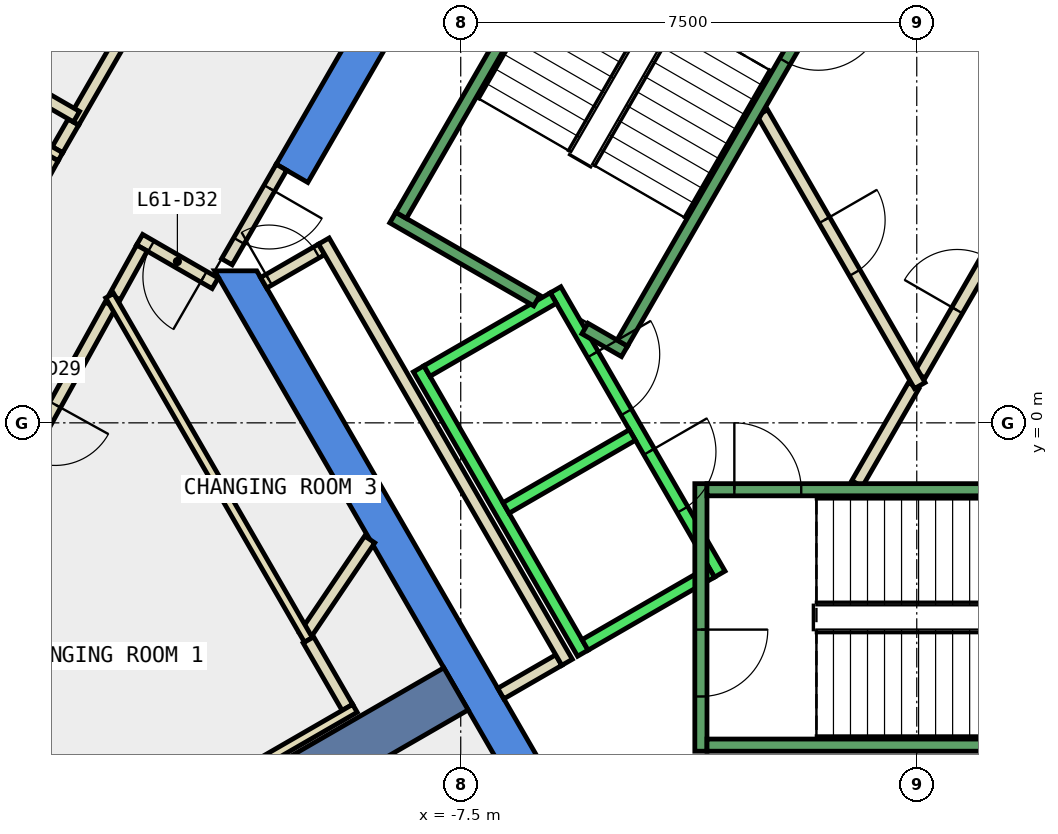
"""IFC4 building model, lengths in metres.
Left out: names, types, materials, properties, quantities, classifications, styles, units other than length and angle.
Written with IfcOpenShell. Run it as: python <this file> out.ifc"""

import sys

from ifc_helpers import new_model, si_unit, direction, frame, frame_2d, origin, place, context, subcontext, project, spatial, polyline, rectangle, outline, extrude, element, fill, save


model = new_model("IFC4")
c1 = context("Model", 3, precision=1e-05, world=origin(), true_north=direction((0.0, 1.0)))
c2 = subcontext(c1, "Body", "Model", "MODEL_VIEW")
j1 = project(units=[si_unit("LENGTHUNIT", "METRE"), si_unit("PLANEANGLEUNIT", "RADIAN")], contexts=[c1])
p1 = place(None, origin())
s1 = spatial("IfcSite", under=j1, at=p1, CompositionType="ELEMENT")
p2 = place(p1, origin())
s2 = spatial("IfcBuilding", under=s1, at=p2, CompositionType="ELEMENT")
p3 = place(p2, frame((0.0, 0.0, 266.6)))
s3 = spatial("IfcBuildingStorey", under=s2, at=p3, CompositionType="ELEMENT", Elevation=266.6)
p4 = place(p3, frame((0.0, 0.0, -0.34)))
e1 = element("IfcWall", 1, at=p4, inside=s3, PredefinedType="SHEAR", context=c2, shape_type="SweptSolid", body=[
    extrude(outline(polyline([(-10.535, 4.253), (-10.015, 3.953), (-5.427, 11.9), (-5.774, 12.5), (-10.535, 4.253)])), origin(), (0.0, 0.0, 1.0), 3.6),
])
p5 = place(p3, frame((0.0, 0.0, -0.34)))
e2 = element("IfcWall", 2, at=p5, inside=s3, PredefinedType="SHEAR", context=c2, shape_type="SweptSolid", body=[
    extrude(outline(polyline([(-11.547, 2.5), (-5.774, -7.5), (-5.427, -6.9), (-10.854, 2.5), (-11.547, 2.5)])), origin(), (0.0, 0.0, 1.0), 3.6),
])
p6 = place(p3, frame((-7.578, -4.375, -0.34), z_axis=(0.0, 0.0, 1.0), x_axis=(-0.866024315419, -0.5000018851, 0.0)))
e3 = element("IfcWall", 3, at=p6, inside=s3, PredefinedType="SHEAR", context=c2, shape_type="SweptSolid", body=[
    extrude(rectangle(XDim=9.0, YDim=0.8, at=frame_2d((4.5, 0.0))), origin(), (0.0, 0.0, 1.0), 3.6),
])
p7 = place(p3, frame((-11.539, 2.295, 0.0), z_axis=(0.0, 0.0, 1.0), x_axis=(-0.866023989838, 0.500002449018, 0.0)))
e4 = element("IfcWall", 4, at=p7, inside=s3, PredefinedType="PARTITIONING", context=c2, shape_type="SweptSolid", body=[
    extrude(rectangle(XDim=1.434, YDim=0.2, at=frame_2d((0.717, 0.0))), origin(), (0.0, 0.0, 1.0), 3.26),
])
p8 = place(p7, frame((0.217, 0.0, 0.0)))
e5 = element("IfcOpeningElement", 5, at=p8, cuts=e4, PredefinedType="OPENING", context=c2, shape_type="SweptSolid", body=[
    extrude(rectangle(XDim=1.0, YDim=2.1, at=frame_2d((0.5, 1.05))), frame((0.0, 0.11, 0.0), z_axis=(0.0, -1.0, 0.0), x_axis=(1.0, 0.0, 0.0)), (0.0, 0.0, 1.0), 0.22),
])
p9 = place(p3, frame((-12.743, 2.875, 0.0), z_axis=(0.0, 0.0, 1.0), x_axis=(-0.484334040176, -0.8748831565, 0.0)))
e6 = element("IfcWall", 6, at=p9, inside=s3, PredefinedType="PARTITIONING", context=c2, shape_type="SweptSolid", body=[
    extrude(rectangle(XDim=0.919, YDim=0.2, at=frame_2d((0.459, 0.0))), origin(), (0.0, 0.0, 1.0), 3.26),
])
p10 = place(p3, frame((-13.261, 1.939, 0.0), z_axis=(0.0, 0.0, 1.0), x_axis=(-0.484323615817, -0.874888927329, 0.0)))
e7 = element("IfcWall", 7, at=p10, inside=s3, PredefinedType="PARTITIONING", context=c2, shape_type="SweptSolid", body=[
    extrude(rectangle(XDim=4.747, YDim=0.2, at=frame_2d((2.374, 0.0))), origin(), (0.0, 0.0, 1.0), 3.26),
])
p11 = place(p10, frame((1.874, 0.0, 0.0)))
e8 = element("IfcOpeningElement", 8, at=p11, cuts=e7, PredefinedType="OPENING", context=c2, shape_type="SweptSolid", body=[
    extrude(rectangle(XDim=1.0, YDim=2.1, at=frame_2d((0.5, 1.05))), frame((0.0, 0.11, 0.0), z_axis=(0.0, -1.0, 0.0), x_axis=(1.0, 0.0, 0.0)), (0.0, 0.0, 1.0), 0.22),
])
p12 = place(p3, frame((-14.132, 4.492, 0.0), z_axis=(0.0, 0.0, 1.0), x_axis=(0.499829488579, 0.86612382622, 0.0)))
e9 = element("IfcWall", 9, at=p12, inside=s3, PredefinedType="PARTITIONING", context=c2, shape_type="SweptSolid", body=[
    extrude(rectangle(XDim=0.527, YDim=0.2, at=frame_2d((0.263, 0.0))), origin(), (0.0, 0.0, 1.0), 3.26),
])
p13 = place(p3, frame((-13.869, 4.948, 0.0), z_axis=(0.0, 0.0, 1.0), x_axis=(0.49994636267, 0.866056369097, 0.0)))
e10 = element("IfcWall", 10, at=p13, inside=s3, PredefinedType="PARTITIONING", context=c2, shape_type="SweptSolid", body=[
    extrude(rectangle(XDim=2.8, YDim=0.2, at=frame_2d((1.4, 0.0))), origin(), (0.0, 0.0, 1.0), 3.26),
])
p14 = place(p3, frame((-15.671, 1.714, 0.0), z_axis=(0.0, 0.0, 1.0), x_axis=(0.484203367026, 0.874955484216, 0.0)))
e11 = element("IfcWall", 11, at=p14, inside=s3, PredefinedType="PARTITIONING", context=c2, shape_type="SweptSolid", body=[
    extrude(rectangle(XDim=3.025, YDim=0.2, at=frame_2d((1.513, 0.0))), origin(), (0.0, 0.0, 1.0), 3.26),
])
p15 = place(p14, frame((1.013, 0.0, 0.0)))
e12 = element("IfcOpeningElement", 12, at=p15, cuts=e11, PredefinedType="OPENING", context=c2, shape_type="SweptSolid", body=[
    extrude(rectangle(XDim=1.0, YDim=2.1, at=frame_2d((0.5, 1.05))), frame((0.0, 0.11, 0.0), z_axis=(0.0, -1.0, 0.0), x_axis=(1.0, 0.0, 0.0)), (0.0, 0.0, 1.0), 0.22),
])
p16 = place(p3, frame((-5.888, -3.902, 0.0), z_axis=(0.0, 0.0, 1.0), x_axis=(-0.86621513555, -0.499671230855, 0.0)))
e13 = element("IfcWall", 13, at=p16, inside=s3, PredefinedType="PARTITIONING", context=c2, shape_type="SweptSolid", body=[
    extrude(rectangle(XDim=1.1, YDim=0.2, at=frame_2d((0.55, 0.0))), origin(), (0.0, 0.0, 1.0), 3.26),
])
p17 = place(p3, frame((-10.741, 2.303, 0.0), z_axis=(0.0, 0.0, 1.0), x_axis=(0.866063652425, 0.499933745558, 0.0)))
e14 = element("IfcWall", 14, at=p17, inside=s3, PredefinedType="PARTITIONING", context=c2, shape_type="SweptSolid", body=[
    extrude(rectangle(XDim=1.1, YDim=0.2, at=frame_2d((0.55, 0.0))), origin(), (0.0, 0.0, 1.0), 3.26),
])
p18 = place(p17, frame((0.1, 0.0, 0.0)))
e15 = element("IfcOpeningElement", 15, at=p18, cuts=e14, PredefinedType="OPENING", context=c2, shape_type="SweptSolid", body=[
    extrude(rectangle(XDim=0.9, YDim=2.1, at=frame_2d((0.45, 1.05))), frame((0.0, 0.11, 0.0), z_axis=(0.0, -1.0, 0.0), x_axis=(1.0, 0.0, 0.0)), (0.0, 0.0, 1.0), 0.22),
])
p19 = place(p3, frame((-9.751, 2.99, 0.0), z_axis=(0.0, 0.0, 1.0), x_axis=(0.500012163284, -0.866018381195, 0.0)))
e16 = element("IfcWall", 16, at=p19, inside=s3, PredefinedType="PARTITIONING", context=c2, shape_type="SweptSolid", body=[
    extrude(rectangle(XDim=8.0, YDim=0.2, at=frame_2d((4.0, 0.0))), origin(), (0.0, 0.0, 1.0), 3.26),
])
p20 = place(p3, frame((-10.069, -3.504, 0.0), z_axis=(0.0, 0.0, 1.0), x_axis=(0.559779346026, 0.828641710127, 0.0)))
e17 = element("IfcWall", 17, at=p20, inside=s3, PredefinedType="PARTITIONING", context=c2, shape_type="SweptSolid", body=[
    extrude(rectangle(XDim=1.915, YDim=0.2, at=frame_2d((0.958, 0.0))), origin(), (0.0, 0.0, 1.0), 3.26),
])
p21 = place(p3, frame((-13.274, 2.092, 0.0), z_axis=(0.0, 0.0, 1.0), x_axis=(0.500002592159, -0.866023907196, 0.0)))
e18 = element("IfcWall", 18, at=p21, inside=s3, PredefinedType="PARTITIONING", context=c2, shape_type="SweptSolid", body=[
    extrude(rectangle(XDim=6.538, YDim=0.15, at=frame_2d((3.269, 0.0))), origin(), (0.0, 0.0, 1.0), 3.26),
])
p22 = place(p3, frame((-0.982, -1.0, 0.0), z_axis=(0.0, 0.0, 1.0), x_axis=(0.50024047865, 0.865886518847, 0.0)))
e19 = element("IfcWall", 19, at=p22, inside=s3, PredefinedType="PARTITIONING", context=c2, shape_type="SweptSolid", body=[
    extrude(rectangle(XDim=1.863, YDim=0.2, at=frame_2d((0.931, 0.0))), origin(), (0.0, 0.0, 1.0), 3.26),
])
p23 = place(p3, frame((0.05, 0.787, 0.0), z_axis=(0.0, 0.0, 1.0), x_axis=(0.499954076797, 0.866051915934, 0.0)))
e20 = element("IfcWall", 20, at=p23, inside=s3, PredefinedType="PARTITIONING", context=c2, shape_type="SweptSolid", body=[
    extrude(rectangle(XDim=3.558, YDim=0.2, at=frame_2d((1.779, 0.0))), origin(), (0.0, 0.0, 1.0), 3.26),
])
p24 = place(p23, frame((1.229, 0.0, 0.0)))
e21 = element("IfcOpeningElement", 21, at=p24, cuts=e20, PredefinedType="OPENING", context=c2, shape_type="SweptSolid", body=[
    extrude(rectangle(XDim=1.0, YDim=2.1, at=frame_2d((0.5, 1.05))), frame((0.0, 0.11, 0.0), z_axis=(0.0, -1.0, 0.0), x_axis=(1.0, 0.0, 0.0)), (0.0, 0.0, 1.0), 0.22),
])
p25 = place(p3, frame((-2.54, 5.1, 0.0), z_axis=(0.0, 0.0, 1.0), x_axis=(0.499925051871, -0.866068670783, 0.0)))
e22 = element("IfcWall", 22, at=p25, inside=s3, PredefinedType="PARTITIONING", context=c2, shape_type="SweptSolid", body=[
    extrude(rectangle(XDim=5.181, YDim=0.2, at=frame_2d((2.59, 0.0))), origin(), (0.0, 0.0, 1.0), 3.26),
])
p26 = place(p25, frame((2.04, 0.0, 0.0)))
e23 = element("IfcOpeningElement", 23, at=p26, cuts=e22, PredefinedType="OPENING", context=c2, shape_type="SweptSolid", body=[
    extrude(rectangle(XDim=1.0, YDim=2.1, at=frame_2d((0.5, 1.05))), frame((0.0, 0.11, 0.0), z_axis=(0.0, -1.0, 0.0), x_axis=(1.0, 0.0, 0.0)), (0.0, 0.0, 1.0), 0.22),
])
p27 = place(p3, frame((-9.364, -4.68, 0.0), z_axis=(0.0, 0.0, 1.0), x_axis=(-0.500052244015, 0.865995238587, 0.0)))
e24 = element("IfcWall", 24, at=p27, inside=s3, PredefinedType="PARTITIONING", context=c2, shape_type="SweptSolid", body=[
    extrude(rectangle(XDim=1.281, YDim=0.2, at=frame_2d((0.641, 0.0))), origin(), (0.0, 0.0, 1.0), 3.26),
])
p28 = place(p3, frame((-9.24, -4.695, 0.0), z_axis=(0.0, 0.0, 1.0), x_axis=(-0.866015037582, -0.500017954359, 0.0)))
e25 = element("IfcWall", 25, at=p28, inside=s3, PredefinedType="PARTITIONING", context=c2, shape_type="SweptSolid", body=[
    extrude(rectangle(XDim=7.176, YDim=0.15, at=frame_2d((3.588, 0.0))), origin(), (0.0, 0.0, 1.0), 3.26),
])
p29 = place(p3, frame((-15.984, 6.285, 0.0), z_axis=(0.0, 0.0, 1.0), x_axis=(0.865998541277, -0.500046524342, 0.0)))
e26 = element("IfcWall", 26, at=p29, inside=s3, PredefinedType="PARTITIONING", context=c2, shape_type="SweptSolid", body=[
    extrude(rectangle(XDim=2.5, YDim=0.2, at=frame_2d((1.25, 0.0))), origin(), (0.0, 0.0, 1.0), 3.26),
])
p30 = place(p3, frame((-14.083, 4.377, 0.0), z_axis=(0.0, 0.0, 1.0), x_axis=(-0.870415885751, 0.492317159799, 0.0)))
e27 = element("IfcWall", 27, at=p30, inside=s3, PredefinedType="PARTITIONING", context=c2, shape_type="SweptSolid", body=[
    extrude(rectangle(XDim=4.581, YDim=0.15, at=frame_2d((2.29, 0.0))), origin(), (0.0, 0.0, 1.0), 3.26),
])
p31 = place(p3, frame((-10.449, 4.203, 0.0), z_axis=(0.0, 0.0, 1.0), x_axis=(-0.499914839587, -0.866074565589, 0.0)))
e28 = element("IfcWall", 28, at=p31, inside=s3, PredefinedType="PARTITIONING", context=c2, shape_type="SweptSolid", body=[
    extrude(rectangle(XDim=1.794, YDim=0.2, at=frame_2d((0.897, 0.0))), origin(), (0.0, 0.0, 1.0), 2.4),
])
p32 = place(p31, frame((0.397, 0.0, 0.0)))
e29 = element("IfcOpeningElement", 29, at=p32, cuts=e28, PredefinedType="OPENING", context=c2, shape_type="SweptSolid", body=[
    extrude(rectangle(XDim=1.0, YDim=2.1, at=frame_2d((0.5, 1.05))), frame((0.0, 0.11, 0.0), z_axis=(0.0, -1.0, 0.0), x_axis=(1.0, 0.0, 0.0)), (0.0, 0.0, 1.0), 0.22),
])
p33 = place(p3, frame((-5.94, 2.188, 0.0), z_axis=(0.0, 0.0, 1.0), x_axis=(0.500034260056, -0.866005622828, 0.0)))
e30 = element("IfcWall", 30, at=p33, inside=s3, PredefinedType="STANDARD", context=c2, shape_type="SweptSolid", body=[
    extrude(rectangle(XDim=5.399, YDim=0.2, at=frame_2d((2.7, 0.0))), origin(), (0.0, 0.0, 1.0), 3.26),
])
p34 = place(p33, frame((3.075, 0.0, 0.0)))
e31 = element("IfcOpeningElement", 31, at=p34, cuts=e30, PredefinedType="OPENING", context=c2, shape_type="SweptSolid", body=[
    extrude(rectangle(XDim=1.1, YDim=2.1, at=frame_2d((0.55, 1.05))), frame((0.0, 0.11, 0.0), z_axis=(0.0, -1.0, 0.0), x_axis=(1.0, 0.0, 0.0)), (0.0, 0.0, 1.0), 0.22),
])
p35 = place(p33, frame((1.225, 0.0, 0.0)))
e32 = element("IfcOpeningElement", 32, at=p35, cuts=e30, PredefinedType="OPENING", context=c2, shape_type="SweptSolid", body=[
    extrude(rectangle(XDim=1.1, YDim=2.1, at=frame_2d((0.55, 1.05))), frame((0.0, 0.11, 0.0), z_axis=(0.0, -1.0, 0.0), x_axis=(1.0, 0.0, 0.0)), (0.0, 0.0, 1.0), 0.22),
])
p36 = place(p3, frame((-8.192, 0.888, 0.0), z_axis=(0.0, 0.0, 1.0), x_axis=(0.500034260056, -0.866005622828, 0.0)))
e33 = element("IfcWall", 33, at=p36, inside=s3, PredefinedType="STANDARD", context=c2, shape_type="SweptSolid", body=[
    extrude(rectangle(XDim=5.399, YDim=0.2, at=frame_2d((2.7, 0.0))), origin(), (0.0, 0.0, 1.0), 3.26),
])
for number, where, z_axis, x_axis in (
    (34, (-5.977, 2.052, 0.0), (0.0, 0.0, 1.0), (-0.866, -0.5, 0.0)),
    (35, (-4.677, -0.2, 0.0), (0.0, 0.0, 1.0), (-0.866, -0.5, 0.0)),
):
    element("IfcWall", number, at=place(p3, frame(where, z_axis=z_axis, x_axis=x_axis)), inside=s3, PredefinedType="STANDARD", context=c2, shape_type="SweptSolid", body=[
        extrude(rectangle(XDim=2.399, YDim=0.2, at=frame_2d((1.2, 0.0))), origin(), (0.0, 0.0, 1.0), 3.26),
    ])
p37 = place(p3, frame((-3.377, -2.452, 0.0), z_axis=(0.0, 0.0, 1.0), x_axis=(-0.865955154139, -0.50012165622, 0.0)))
e36 = element("IfcWall", 36, at=p37, inside=s3, PredefinedType="STANDARD", context=c2, shape_type="SweptSolid", body=[
    extrude(rectangle(XDim=2.4, YDim=0.2, at=frame_2d((1.2, 0.0))), origin(), (0.0, 0.0, 1.0), 3.26),
])
p38 = place(p3, frame((-3.55, -1.0, 0.0), z_axis=(0.0, 0.0, 1.0), x_axis=(0.0, -1.0, 0.0)))
e37 = element("IfcWall", 37, at=p38, inside=s3, PredefinedType="STANDARD", context=c2, shape_type="SweptSolid", body=[
    extrude(rectangle(XDim=4.4, YDim=0.2, at=frame_2d((2.2, 0.0))), origin(), (0.0, 0.0, 1.0), 3.26),
])
p39 = place(p38, frame((2.4, 0.0, 0.0)))
e38 = element("IfcOpeningElement", 38, at=p39, cuts=e37, PredefinedType="OPENING", context=c2, shape_type="SweptSolid", body=[
    extrude(rectangle(XDim=1.1, YDim=2.2, at=frame_2d((0.55, 1.1))), frame((0.0, 0.11, 0.0), z_axis=(0.0, -1.0, 0.0), x_axis=(1.0, 0.0, 0.0)), (0.0, 0.0, 1.0), 0.22),
])
p40 = place(p3, frame((-3.45, -1.1, 0.0), z_axis=(0.0, 0.0, 1.0), x_axis=(1.0, 0.0, 0.0)))
e39 = element("IfcWall", 39, at=p40, inside=s3, PredefinedType="STANDARD", context=c2, shape_type="SweptSolid", body=[
    extrude(rectangle(XDim=6.9, YDim=0.2, at=frame_2d((3.45, 0.0))), origin(), (0.0, 0.0, 1.0), 3.26),
])
p41 = place(p40, frame((0.45, 0.0, 0.0)))
e40 = element("IfcOpeningElement", 40, at=p41, cuts=e39, PredefinedType="OPENING", context=c2, shape_type="SweptSolid", body=[
    extrude(rectangle(XDim=1.1, YDim=2.2, at=frame_2d((0.55, 1.1))), frame((0.0, 0.11, 0.0), z_axis=(0.0, -1.0, 0.0), x_axis=(1.0, 0.0, 0.0)), (0.0, 0.0, 1.0), 0.22),
])
p42 = place(p3, frame((-3.45, -5.3, 0.0), z_axis=(0.0, 0.0, 1.0), x_axis=(1.0, 0.0, 0.0)))
e41 = element("IfcWall", 41, at=p42, inside=s3, PredefinedType="STANDARD", context=c2, shape_type="SweptSolid", body=[
    extrude(rectangle(XDim=6.9, YDim=0.2, at=frame_2d((3.45, 0.0))), origin(), (0.0, 0.0, 1.0), 3.26),
])
p43 = place(p3, frame((-6.25, 2.01, 0.0), z_axis=(0.0, 0.0, 1.0), x_axis=(-0.86611865017, 0.499838457731, 0.0)))
e42 = element("IfcWall", 42, at=p43, inside=s3, PredefinedType="STANDARD", context=c2, shape_type="SweptSolid", body=[
    extrude(rectangle(XDim=2.733, YDim=0.2, at=frame_2d((1.366, 0.0))), origin(), (0.0, 0.0, 1.0), 3.26),
])
p44 = place(p3, frame((-4.806, 1.176, 0.0), z_axis=(0.0, 0.0, 1.0), x_axis=(-0.866558586415, 0.499075361355, 0.0)))
e43 = element("IfcWall", 43, at=p44, inside=s3, PredefinedType="STANDARD", context=c2, shape_type="SweptSolid", body=[
    extrude(rectangle(XDim=0.751, YDim=0.2, at=frame_2d((0.376, 0.0))), origin(), (0.0, 0.0, 1.0), 3.26),
])
p45 = place(p3, frame((-1.393, 7.288, 0.0), z_axis=(0.0, 0.0, 1.0), x_axis=(-0.499963383562, -0.866046543262, 0.0)))
e44 = element("IfcWall", 44, at=p45, inside=s3, PredefinedType="STANDARD", context=c2, shape_type="SweptSolid", body=[
    extrude(rectangle(XDim=6.9, YDim=0.2, at=frame_2d((3.45, 0.0))), origin(), (0.0, 0.0, 1.0), 3.26),
])
p46 = place(p45, frame((0.45, 0.0, 0.0)))
e45 = element("IfcOpeningElement", 45, at=p46, cuts=e44, PredefinedType="OPENING", context=c2, shape_type="SweptSolid", body=[
    extrude(rectangle(XDim=1.1, YDim=2.2, at=frame_2d((0.55, 1.1))), frame((0.0, 0.11, 0.0), z_axis=(0.0, -1.0, 0.0), x_axis=(1.0, 0.0, 0.0)), (0.0, 0.0, 1.0), 0.22),
])
p47 = place(p3, frame((-5.03, 9.388, 0.0), z_axis=(0.0, 0.0, 1.0), x_axis=(-0.499978703459, -0.866037698999, 0.0)))
e46 = element("IfcWall", 46, at=p47, inside=s3, PredefinedType="STANDARD", context=c2, shape_type="SweptSolid", body=[
    extrude(rectangle(XDim=6.9, YDim=0.2, at=frame_2d((3.45, 0.0))), origin(), (0.0, 0.0, 1.0), 3.26),
])
p48 = place(p11, origin())
e47 = element("IfcDoor", 47, at=p48, inside=s3, OperationType="SINGLE_SWING_LEFT", PredefinedType="DOOR", context=c2, shape_type="SweptSolid", body=[
    extrude(rectangle(XDim=1.0, YDim=2.1, at=frame_2d((0.5, 1.05))), frame((0.0, 0.025, 0.0), z_axis=(0.0, -1.0, 0.0), x_axis=(1.0, 0.0, 0.0)), (0.0, 0.0, 1.0), 0.05),
])
fill(e8, e47)
p49 = place(p8, origin())
e48 = element("IfcDoor", 48, at=p49, inside=s3, OperationType="SINGLE_SWING_RIGHT", PredefinedType="DOOR", context=c2, shape_type="SweptSolid", body=[
    extrude(rectangle(XDim=1.0, YDim=2.1, at=frame_2d((0.5, 1.05))), frame((0.0, 0.025, 0.0), z_axis=(0.0, -1.0, 0.0), x_axis=(1.0, 0.0, 0.0)), (0.0, 0.0, 1.0), 0.05),
])
fill(e5, e48)
p50 = place(p24, origin())
e49 = element("IfcDoor", 49, at=p50, inside=s3, OperationType="SINGLE_SWING_RIGHT", PredefinedType="DOOR", context=c2, shape_type="SweptSolid", body=[
    extrude(rectangle(XDim=1.0, YDim=2.1, at=frame_2d((0.5, 1.05))), frame((0.0, 0.025, 0.0), z_axis=(0.0, -1.0, 0.0), x_axis=(1.0, 0.0, 0.0)), (0.0, 0.0, 1.0), 0.05),
])
fill(e21, e49)
p51 = place(p26, origin())
e50 = element("IfcDoor", 50, at=p51, inside=s3, OperationType="SINGLE_SWING_RIGHT", PredefinedType="DOOR", context=c2, shape_type="SweptSolid", body=[
    extrude(rectangle(XDim=1.0, YDim=2.1, at=frame_2d((0.5, 1.05))), frame((0.0, 0.025, 0.0), z_axis=(0.0, -1.0, 0.0), x_axis=(1.0, 0.0, 0.0)), (0.0, 0.0, 1.0), 0.05),
])
fill(e23, e50)
p52 = place(p18, origin())
e51 = element("IfcDoor", 51, at=p52, inside=s3, OperationType="SINGLE_SWING_RIGHT", PredefinedType="DOOR", context=c2, shape_type="SweptSolid", body=[
    extrude(rectangle(XDim=0.9, YDim=2.1, at=frame_2d((0.45, 1.05))), frame((0.0, 0.025, 0.0), z_axis=(0.0, -1.0, 0.0), x_axis=(1.0, 0.0, 0.0)), (0.0, 0.0, 1.0), 0.05),
])
fill(e15, e51)
p53 = place(p32, origin())
e52 = element("IfcDoor", 52, at=p53, inside=s3, OperationType="SINGLE_SWING_LEFT", PredefinedType="DOOR", context=c2, shape_type="SweptSolid", body=[
    extrude(rectangle(XDim=1.0, YDim=2.1, at=frame_2d((0.5, 1.05))), frame((0.0, 0.025, 0.0), z_axis=(0.0, -1.0, 0.0), x_axis=(1.0, 0.0, 0.0)), (0.0, 0.0, 1.0), 0.05),
])
fill(e29, e52)
p54 = place(p34, origin())
e53 = element("IfcDoor", 53, at=p54, inside=s3, OperationType="SLIDING_TO_LEFT", PredefinedType="DOOR", context=c2, shape_type="SweptSolid", body=[
    extrude(rectangle(XDim=1.1, YDim=2.1, at=frame_2d((0.55, 1.05))), frame((0.0, 0.025, 0.0), z_axis=(0.0, -1.0, 0.0), x_axis=(1.0, 0.0, 0.0)), (0.0, 0.0, 1.0), 0.05),
])
fill(e31, e53)
p55 = place(p35, origin())
e54 = element("IfcDoor", 54, at=p55, inside=s3, OperationType="SLIDING_TO_LEFT", PredefinedType="DOOR", context=c2, shape_type="SweptSolid", body=[
    extrude(rectangle(XDim=1.1, YDim=2.1, at=frame_2d((0.55, 1.05))), frame((0.0, 0.025, 0.0), z_axis=(0.0, -1.0, 0.0), x_axis=(1.0, 0.0, 0.0)), (0.0, 0.0, 1.0), 0.05),
])
fill(e32, e54)
p56 = place(p41, origin())
e55 = element("IfcDoor", 55, at=p56, inside=s3, OperationType="SINGLE_SWING_LEFT", PredefinedType="DOOR", context=c2, shape_type="SweptSolid", body=[
    extrude(rectangle(XDim=1.1, YDim=2.2, at=frame_2d((0.55, 1.1))), frame((0.0, 0.025, 0.0), z_axis=(0.0, -1.0, 0.0), x_axis=(1.0, 0.0, 0.0)), (0.0, 0.0, 1.0), 0.05),
])
fill(e40, e55)
p57 = place(p39, origin())
e56 = element("IfcDoor", 56, at=p57, inside=s3, OperationType="SINGLE_SWING_LEFT", PredefinedType="DOOR", context=c2, shape_type="SweptSolid", body=[
    extrude(rectangle(XDim=1.1, YDim=2.2, at=frame_2d((0.55, 1.1))), frame((0.0, 0.025, 0.0), z_axis=(0.0, -1.0, 0.0), x_axis=(1.0, 0.0, 0.0)), (0.0, 0.0, 1.0), 0.05),
])
fill(e38, e56)
p58 = place(p46, origin())
e57 = element("IfcDoor", 57, at=p58, inside=s3, OperationType="SINGLE_SWING_LEFT", PredefinedType="DOOR", context=c2, shape_type="SweptSolid", body=[
    extrude(rectangle(XDim=1.1, YDim=2.2, at=frame_2d((0.55, 1.1))), frame((0.0, 0.025, 0.0), z_axis=(0.0, -1.0, 0.0), x_axis=(1.0, 0.0, 0.0)), (0.0, 0.0, 1.0), 0.05),
])
fill(e45, e57)
save(model, sys.argv[1])
